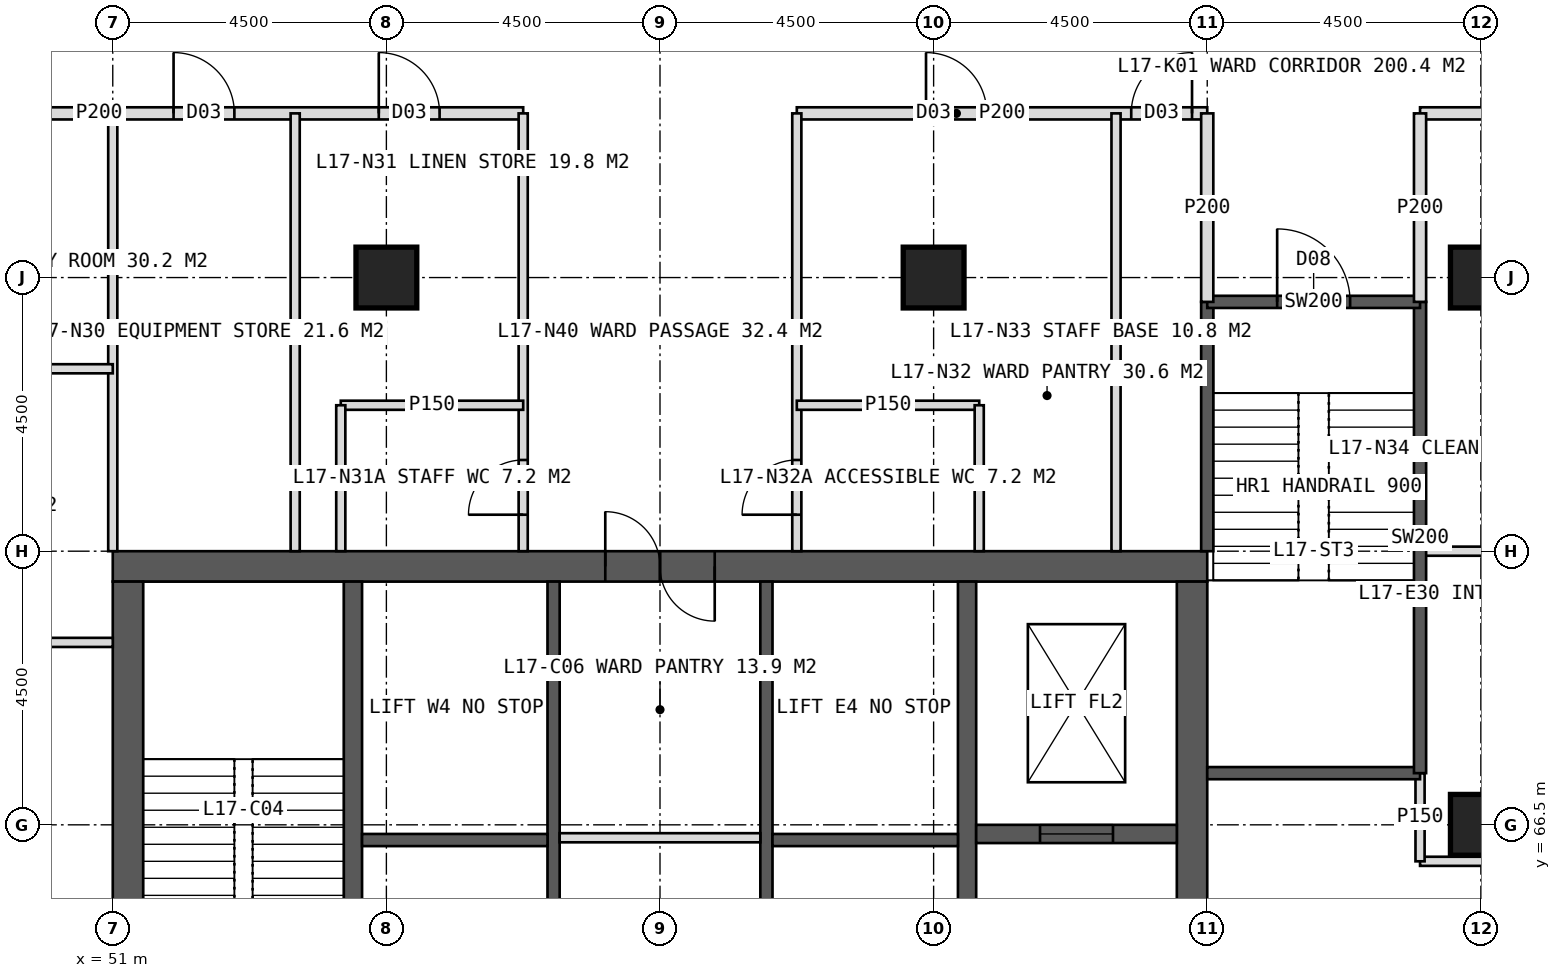
"""IFC4 building model, lengths in metres.
Left out: names, types, materials, properties, quantities, classifications, styles, units other than length and angle.
Written with IfcOpenShell. Run it as: python <this file> out.ifc"""

import sys

from ifc_helpers import new_model, si_unit, direction, frame, frame_2d, origin, origin_2d, place, context, subcontext, project, spatial, rectangle, hollow_rectangle, extrude, element, fill, save


model = new_model("IFC4")
c1 = context("Model", 3, precision=1e-05, world=origin(), true_north=direction((0.0, 1.0)))
c2 = subcontext(c1, "Body", "Model", "MODEL_VIEW")
j1 = project(units=[si_unit("LENGTHUNIT", "METRE"), si_unit("PLANEANGLEUNIT", "RADIAN")], contexts=[c1])
p1 = place(None, origin())
s1 = spatial("IfcSite", under=j1, at=p1, CompositionType="ELEMENT")
p2 = place(p1, origin())
s2 = spatial("IfcBuilding", under=s1, at=p2, CompositionType="ELEMENT")
p3 = place(p2, frame((0.0, 0.0, 75.0)))
s3 = spatial("IfcBuildingStorey", under=s2, at=p3, CompositionType="ELEMENT", Elevation=75.0)
p4 = place(p3, frame((51.0, 70.75, 0.0), z_axis=(0.0, 0.0, 1.0), x_axis=(1.0, 0.0, 0.0)))
e1 = element("IfcWall", 1, at=p4, inside=s3, PredefinedType="SHEAR", context=c2, shape_type="SweptSolid", body=[
    extrude(rectangle(XDim=18.0, YDim=0.5, at=frame_2d((9.0, 0.0))), origin(), (0.0, 0.0, 1.0), 4.0),
])
p5 = place(p4, frame((8.1, 0.0, 0.0)))
e2 = element("IfcOpeningElement", 2, at=p5, cuts=e1, PredefinedType="OPENING", context=c2, shape_type="SweptSolid", body=[
    extrude(rectangle(XDim=1.8, YDim=2.2, at=frame_2d((0.9, 1.1))), frame((0.0, 0.26, 0.0), z_axis=(0.0, -1.0, 0.0), x_axis=(1.0, 0.0, 0.0)), (0.0, 0.0, 1.0), 0.52),
])
p6 = place(p3, frame((51.25, 53.5, 0.0), z_axis=(0.0, 0.0, 1.0), x_axis=(0.0, 1.0, 0.0)))
e3 = element("IfcWall", 3, at=p6, inside=s3, PredefinedType="SHEAR", context=c2, shape_type="SweptSolid", body=[
    extrude(rectangle(XDim=17.0, YDim=0.5, at=frame_2d((8.5, 0.0))), origin(), (0.0, 0.0, 1.0), 4.0),
])
p7 = place(p6, frame((6.0, 0.0, 0.0)))
e4 = element("IfcOpeningElement", 4, at=p7, cuts=e3, PredefinedType="OPENING", context=c2, shape_type="SweptSolid", body=[
    extrude(rectangle(XDim=1.5, YDim=2.2, at=frame_2d((0.75, 1.1))), frame((0.0, 0.26, 0.0), z_axis=(0.0, -1.0, 0.0), x_axis=(1.0, 0.0, 0.0)), (0.0, 0.0, 1.0), 0.52),
])
p8 = place(p3, frame((68.75, 53.5, 0.0), z_axis=(0.0, 0.0, 1.0), x_axis=(0.0, 1.0, 0.0)))
e5 = element("IfcWall", 5, at=p8, inside=s3, PredefinedType="SHEAR", context=c2, shape_type="SweptSolid", body=[
    extrude(rectangle(XDim=17.0, YDim=0.5, at=frame_2d((8.5, 0.0))), origin(), (0.0, 0.0, 1.0), 4.0),
])
p9 = place(p8, frame((9.5, 0.0, 0.0)))
e6 = element("IfcOpeningElement", 6, at=p9, cuts=e5, PredefinedType="OPENING", context=c2, shape_type="SweptSolid", body=[
    extrude(rectangle(XDim=1.5, YDim=2.2, at=frame_2d((0.75, 1.1))), frame((0.0, 0.26, 0.0), z_axis=(0.0, -1.0, 0.0), x_axis=(1.0, 0.0, 0.0)), (0.0, 0.0, 1.0), 0.52),
])
for number, where, z_axis, x_axis in (
    (7, (54.95, 53.5, 0.0), (0.0, 0.0, 1.0), (0.0, 1.0, 0.0)),
    (8, (65.05, 53.5, 0.0), (0.0, 0.0, 1.0), (0.0, 1.0, 0.0)),
):
    element("IfcWall", number, at=place(p3, frame(where, z_axis=z_axis, x_axis=x_axis)), inside=s3, PredefinedType="SHEAR", context=c2, shape_type="SweptSolid", body=[
        extrude(rectangle(XDim=17.0, YDim=0.3, at=frame_2d((8.5, 0.0))), origin(), (0.0, 0.0, 1.0), 4.0),
    ])
p10 = place(p3, frame((58.25, 53.5, 0.0), z_axis=(0.0, 0.0, 1.0), x_axis=(0.0, 1.0, 0.0)))
e9 = element("IfcWall", 9, at=p10, inside=s3, PredefinedType="SHEAR", context=c2, shape_type="SweptSolid", body=[
    extrude(rectangle(XDim=17.0, YDim=0.2, at=frame_2d((8.5, 0.0))), origin(), (0.0, 0.0, 1.0), 4.0),
])
p11 = place(p10, frame((1.375, 0.0, 0.0)))
e10 = element("IfcOpeningElement", 10, at=p11, cuts=e9, PredefinedType="OPENING", context=c2, shape_type="SweptSolid", body=[
    extrude(rectangle(XDim=1.4, YDim=2.2, at=frame_2d((0.7, 1.1))), frame((0.0, 0.11, 0.0), z_axis=(0.0, -1.0, 0.0), x_axis=(1.0, 0.0, 0.0)), (0.0, 0.0, 1.0), 0.22),
])
p12 = place(p10, frame((5.675, 0.0, 0.0)))
e11 = element("IfcOpeningElement", 11, at=p12, cuts=e9, PredefinedType="OPENING", context=c2, shape_type="SweptSolid", body=[
    extrude(rectangle(XDim=1.4, YDim=2.2, at=frame_2d((0.7, 1.1))), frame((0.0, 0.11, 0.0), z_axis=(0.0, -1.0, 0.0), x_axis=(1.0, 0.0, 0.0)), (0.0, 0.0, 1.0), 0.22),
])
p13 = place(p3, frame((61.75, 53.5, 0.0), z_axis=(0.0, 0.0, 1.0), x_axis=(0.0, 1.0, 0.0)))
e12 = element("IfcWall", 12, at=p13, inside=s3, PredefinedType="SHEAR", context=c2, shape_type="SweptSolid", body=[
    extrude(rectangle(XDim=17.0, YDim=0.2, at=frame_2d((8.5, 0.0))), origin(), (0.0, 0.0, 1.0), 4.0),
])
p14 = place(p13, frame((1.375, 0.0, 0.0)))
e13 = element("IfcOpeningElement", 13, at=p14, cuts=e12, PredefinedType="OPENING", context=c2, shape_type="SweptSolid", body=[
    extrude(rectangle(XDim=1.4, YDim=2.2, at=frame_2d((0.7, 1.1))), frame((0.0, 0.11, 0.0), z_axis=(0.0, -1.0, 0.0), x_axis=(1.0, 0.0, 0.0)), (0.0, 0.0, 1.0), 0.22),
])
p15 = place(p13, frame((5.675, 0.0, 0.0)))
e14 = element("IfcOpeningElement", 14, at=p15, cuts=e12, PredefinedType="OPENING", context=c2, shape_type="SweptSolid", body=[
    extrude(rectangle(XDim=1.4, YDim=2.2, at=frame_2d((0.7, 1.1))), frame((0.0, 0.11, 0.0), z_axis=(0.0, -1.0, 0.0), x_axis=(1.0, 0.0, 0.0)), (0.0, 0.0, 1.0), 0.22),
])
for number, where, z_axis, x_axis in (
    (15, (55.1, 66.25, 0.0), (0.0, 0.0, 1.0), (1.0, 0.0, 0.0)),
    (16, (61.85, 66.25, 0.0), (0.0, 0.0, 1.0), (1.0, 0.0, 0.0)),
):
    element("IfcWall", number, at=place(p3, frame(where, z_axis=z_axis, x_axis=x_axis)), inside=s3, PredefinedType="SHEAR", context=c2, shape_type="SweptSolid", body=[
        extrude(rectangle(XDim=3.05, YDim=0.2, at=frame_2d((1.525, 0.0))), origin(), (0.0, 0.0, 1.0), 4.0),
    ])
p16 = place(p3, frame((65.2, 66.35, 0.0), z_axis=(0.0, 0.0, 1.0), x_axis=(1.0, 0.0, 0.0)))
e17 = element("IfcWall", 17, at=p16, inside=s3, PredefinedType="SHEAR", context=c2, shape_type="SweptSolid", body=[
    extrude(rectangle(XDim=3.3, YDim=0.3, at=frame_2d((1.65, 0.0))), origin(), (0.0, 0.0, 1.0), 4.0),
])
p17 = place(p16, frame((1.05, 0.0, 0.0)))
e18 = element("IfcOpeningElement", 18, at=p17, cuts=e17, PredefinedType="OPENING", context=c2, shape_type="SweptSolid", body=[
    extrude(rectangle(XDim=1.2, YDim=2.2, at=frame_2d((0.6, 1.1))), frame((0.0, 0.16, 0.0), z_axis=(0.0, -1.0, 0.0), x_axis=(1.0, 0.0, 0.0)), (0.0, 0.0, 1.0), 0.32),
])
for number, where, z_axis, x_axis in (
    (19, (73.5, 75.5, 0.0), (0.0, 0.0, 1.0), (1.0, 0.0, 0.0)),
    (20, (55.5, 75.5, 0.0), (0.0, 0.0, 1.0), (1.0, 0.0, 0.0)),
    (21, (64.5, 75.5, 0.0), (0.0, 0.0, 1.0), (1.0, 0.0, 0.0)),
    (22, (73.5, 66.5, 0.0), (0.0, 0.0, 1.0), (1.0, 0.0, 0.0)),
):
    element("IfcColumn", number, at=place(p3, frame(where, z_axis=z_axis, x_axis=x_axis)), inside=s3, PredefinedType="COLUMN", context=c2, shape_type="SweptSolid", body=[
        extrude(hollow_rectangle(XDim=1.0, YDim=1.0, WallThickness=0.1, at=origin_2d()), origin(), (0.0, 0.0, 1.0), 4.0),
    ])
p18 = place(p3, frame((51.0, 71.0, 0.0), z_axis=(0.0, 0.0, 1.0), x_axis=(0.0, 1.0, 0.0)))
e23 = element("IfcWall", 23, at=p18, inside=s3, PredefinedType="PARTITIONING", context=c2, shape_type="SweptSolid", body=[
    extrude(rectangle(XDim=7.2, YDim=0.15, at=frame_2d((3.6, 0.0))), origin(), (0.0, 0.0, 1.0), 3.75),
])
p19 = place(p3, frame((43.8, 78.2, 0.0), z_axis=(0.0, 0.0, 1.0), x_axis=(1.0, 0.0, 0.0)))
e24 = element("IfcWall", 24, at=p19, inside=s3, PredefinedType="PARTITIONING", context=c2, shape_type="SweptSolid", body=[
    extrude(rectangle(XDim=13.95, YDim=0.2, at=frame_2d((6.975, 0.0))), origin(), (0.0, 0.0, 1.0), 3.75),
])
p20 = place(p19, frame((8.2, 0.0, 0.0)))
e25 = element("IfcOpeningElement", 25, at=p20, cuts=e24, PredefinedType="OPENING", context=c2, shape_type="SweptSolid", body=[
    extrude(rectangle(XDim=1.0, YDim=2.1, at=frame_2d((0.5, 1.05))), frame((0.0, 0.11, 0.0), z_axis=(0.0, -1.0, 0.0), x_axis=(1.0, 0.0, 0.0)), (0.0, 0.0, 1.0), 0.22),
])
p21 = place(p19, frame((11.575, 0.0, 0.0)))
e26 = element("IfcOpeningElement", 26, at=p21, cuts=e24, PredefinedType="OPENING", context=c2, shape_type="SweptSolid", body=[
    extrude(rectangle(XDim=1.0, YDim=2.1, at=frame_2d((0.5, 1.05))), frame((0.0, 0.11, 0.0), z_axis=(0.0, -1.0, 0.0), x_axis=(1.0, 0.0, 0.0)), (0.0, 0.0, 1.0), 0.22),
])
p22 = place(p3, frame((62.25, 78.2, 0.0), z_axis=(0.0, 0.0, 1.0), x_axis=(1.0, 0.0, 0.0)))
e27 = element("IfcWall", 27, at=p22, inside=s3, PredefinedType="PARTITIONING", context=c2, shape_type="SweptSolid", body=[
    extrude(rectangle(XDim=6.75, YDim=0.2, at=frame_2d((3.375, 0.0))), origin(), (0.0, 0.0, 1.0), 3.75),
])
p23 = place(p22, frame((2.125, 0.0, 0.0)))
e28 = element("IfcOpeningElement", 28, at=p23, cuts=e27, PredefinedType="OPENING", context=c2, shape_type="SweptSolid", body=[
    extrude(rectangle(XDim=1.0, YDim=2.1, at=frame_2d((0.5, 1.05))), frame((0.0, 0.11, 0.0), z_axis=(0.0, -1.0, 0.0), x_axis=(1.0, 0.0, 0.0)), (0.0, 0.0, 1.0), 0.22),
])
p24 = place(p22, frame((5.5, 0.0, 0.0)))
e29 = element("IfcOpeningElement", 29, at=p24, cuts=e27, PredefinedType="OPENING", context=c2, shape_type="SweptSolid", body=[
    extrude(rectangle(XDim=1.0, YDim=2.1, at=frame_2d((0.5, 1.05))), frame((0.0, 0.11, 0.0), z_axis=(0.0, -1.0, 0.0), x_axis=(1.0, 0.0, 0.0)), (0.0, 0.0, 1.0), 0.22),
])
p25 = place(p3, frame((72.5, 78.2, 0.0), z_axis=(0.0, 0.0, 1.0), x_axis=(1.0, 0.0, 0.0)))
e30 = element("IfcWall", 30, at=p25, inside=s3, PredefinedType="PARTITIONING", context=c2, shape_type="SweptSolid", body=[
    extrude(rectangle(XDim=3.7, YDim=0.2, at=frame_2d((1.85, 0.0))), origin(), (0.0, 0.0, 1.0), 3.75),
])
p26 = place(p25, frame((1.1, 0.0, 0.0)))
e31 = element("IfcOpeningElement", 31, at=p26, cuts=e30, PredefinedType="OPENING", context=c2, shape_type="SweptSolid", body=[
    extrude(rectangle(XDim=1.0, YDim=2.1, at=frame_2d((0.5, 1.05))), frame((0.0, 0.11, 0.0), z_axis=(0.0, -1.0, 0.0), x_axis=(1.0, 0.0, 0.0)), (0.0, 0.0, 1.0), 0.22),
])
p27 = place(p3, frame((57.75, 71.0, 0.0), z_axis=(0.0, 0.0, 1.0), x_axis=(0.0, 1.0, 0.0)))
e32 = element("IfcWall", 32, at=p27, inside=s3, PredefinedType="PARTITIONING", context=c2, shape_type="SweptSolid", body=[
    extrude(rectangle(XDim=7.2, YDim=0.15, at=frame_2d((3.6, 0.0))), origin(), (0.0, 0.0, 1.0), 3.75),
])
p28 = place(p27, frame((0.6, 0.0, 0.0)))
e33 = element("IfcOpeningElement", 33, at=p28, cuts=e32, PredefinedType="OPENING", context=c2, shape_type="SweptSolid", body=[
    extrude(rectangle(XDim=0.9, YDim=2.1, at=frame_2d((0.45, 1.05))), frame((0.0, 0.085, 0.0), z_axis=(0.0, -1.0, 0.0), x_axis=(1.0, 0.0, 0.0)), (0.0, 0.0, 1.0), 0.17),
])
p29 = place(p3, frame((62.25, 71.0, 0.0), z_axis=(0.0, 0.0, 1.0), x_axis=(0.0, 1.0, 0.0)))
e34 = element("IfcWall", 34, at=p29, inside=s3, PredefinedType="PARTITIONING", context=c2, shape_type="SweptSolid", body=[
    extrude(rectangle(XDim=7.2, YDim=0.15, at=frame_2d((3.6, 0.0))), origin(), (0.0, 0.0, 1.0), 3.75),
])
p30 = place(p29, frame((0.6, 0.0, 0.0)))
e35 = element("IfcOpeningElement", 35, at=p30, cuts=e34, PredefinedType="OPENING", context=c2, shape_type="SweptSolid", body=[
    extrude(rectangle(XDim=0.9, YDim=2.1, at=frame_2d((0.45, 1.05))), frame((0.0, 0.085, 0.0), z_axis=(0.0, -1.0, 0.0), x_axis=(1.0, 0.0, 0.0)), (0.0, 0.0, 1.0), 0.17),
])
for number, where, z_axis, x_axis in (
    (36, (54.0, 71.0, 0.0), (0.0, 0.0, 1.0), (0.0, 1.0, 0.0)),
    (37, (67.5, 71.0, 0.0), (0.0, 0.0, 1.0), (0.0, 1.0, 0.0)),
):
    element("IfcWall", number, at=place(p3, frame(where, z_axis=z_axis, x_axis=x_axis)), inside=s3, PredefinedType="PARTITIONING", context=c2, shape_type="SweptSolid", body=[
        extrude(rectangle(XDim=7.2, YDim=0.15, at=frame_2d((3.6, 0.0))), origin(), (0.0, 0.0, 1.0), 3.75),
    ])
p31 = place(p3, frame((54.75, 73.4, 0.0), z_axis=(0.0, 0.0, 1.0), x_axis=(1.0, 0.0, 0.0)))
e38 = element("IfcWall", 38, at=p31, inside=s3, PredefinedType="PARTITIONING", context=c2, shape_type="SweptSolid", body=[
    extrude(rectangle(XDim=3.0, YDim=0.15, at=frame_2d((1.5, 0.0))), origin(), (0.0, 0.0, 1.0), 3.75),
])
p32 = place(p3, frame((54.75, 71.0, 0.0), z_axis=(0.0, 0.0, 1.0), x_axis=(0.0, 1.0, 0.0)))
e39 = element("IfcWall", 39, at=p32, inside=s3, PredefinedType="PARTITIONING", context=c2, shape_type="SweptSolid", body=[
    extrude(rectangle(XDim=2.4, YDim=0.15, at=frame_2d((1.2, 0.0))), origin(), (0.0, 0.0, 1.0), 3.75),
])
p33 = place(p3, frame((62.25, 73.4, 0.0), z_axis=(0.0, 0.0, 1.0), x_axis=(1.0, 0.0, 0.0)))
e40 = element("IfcWall", 40, at=p33, inside=s3, PredefinedType="PARTITIONING", context=c2, shape_type="SweptSolid", body=[
    extrude(rectangle(XDim=3.0, YDim=0.15, at=frame_2d((1.5, 0.0))), origin(), (0.0, 0.0, 1.0), 3.75),
])
p34 = place(p3, frame((65.25, 71.0, 0.0), z_axis=(0.0, 0.0, 1.0), x_axis=(0.0, 1.0, 0.0)))
e41 = element("IfcWall", 41, at=p34, inside=s3, PredefinedType="PARTITIONING", context=c2, shape_type="SweptSolid", body=[
    extrude(rectangle(XDim=2.4, YDim=0.15, at=frame_2d((1.2, 0.0))), origin(), (0.0, 0.0, 1.0), 3.75),
])
for number, where, z_axis, x_axis in (
    (42, (51.0, 69.5, 0.0), (0.0, 0.0, 1.0), (-1.0, 0.0, 0.0)),
    (43, (51.0, 74.0, 0.0), (0.0, 0.0, 1.0), (-1.0, 0.0, 0.0)),
):
    element("IfcWall", number, at=place(p3, frame(where, z_axis=z_axis, x_axis=x_axis)), inside=s3, PredefinedType="PARTITIONING", context=c2, shape_type="SweptSolid", body=[
        extrude(rectangle(XDim=7.2, YDim=0.15, at=frame_2d((3.6, 0.0))), origin(), (0.0, 0.0, 1.0), 3.75),
    ])
for number, where, z_axis, x_axis in (
    (44, (72.5, 71.0, 0.0), (0.0, 0.0, 1.0), (1.0, 0.0, 0.0)),
    (45, (72.5, 65.9, 0.0), (0.0, 0.0, 1.0), (1.0, 0.0, 0.0)),
):
    element("IfcWall", number, at=place(p3, frame(where, z_axis=z_axis, x_axis=x_axis)), inside=s3, PredefinedType="PARTITIONING", context=c2, shape_type="SweptSolid", body=[
        extrude(rectangle(XDim=3.7, YDim=0.15, at=frame_2d((1.85, 0.0))), origin(), (0.0, 0.0, 1.0), 3.75),
    ])
p35 = place(p3, frame((58.35, 66.288, 0.0), z_axis=(0.0, 0.0, 1.0), x_axis=(1.0, 0.0, 0.0)))
e46 = element("IfcWall", 46, at=p35, inside=s3, PredefinedType="PARTITIONING", context=c2, shape_type="SweptSolid", body=[
    extrude(rectangle(XDim=3.3, YDim=0.15, at=frame_2d((1.65, 0.0))), origin(), (0.0, 0.0, 1.0), 3.75),
])
p36 = place(p3, frame((72.5, 65.9, 0.0), z_axis=(0.0, 0.0, 1.0), x_axis=(0.0, 1.0, 0.0)))
e47 = element("IfcWall", 47, at=p36, inside=s3, PredefinedType="PARTITIONING", context=c2, shape_type="SweptSolid", body=[
    extrude(rectangle(XDim=1.45, YDim=0.15, at=frame_2d((0.725, 0.0))), origin(), (0.0, 0.0, 1.0), 3.75),
])
p37 = place(p3, frame((69.0, 71.0, 0.0), z_axis=(0.0, 0.0, 1.0), x_axis=(0.0, 1.0, 0.0)))
e48 = element("IfcWall", 48, at=p37, inside=s3, PredefinedType="SOLIDWALL", context=c2, shape_type="SweptSolid", body=[
    extrude(rectangle(XDim=4.1, YDim=0.2, at=frame_2d((2.05, 0.0))), origin(), (0.0, 0.0, 1.0), 3.75),
])
p38 = place(p3, frame((69.0, 67.35, 0.0), z_axis=(0.0, 0.0, 1.0), x_axis=(1.0, 0.0, 0.0)))
e49 = element("IfcWall", 49, at=p38, inside=s3, PredefinedType="SOLIDWALL", context=c2, shape_type="SweptSolid", body=[
    extrude(rectangle(XDim=3.5, YDim=0.2, at=frame_2d((1.75, 0.0))), origin(), (0.0, 0.0, 1.0), 3.75),
])
p39 = place(p3, frame((72.5, 67.35, 0.0), z_axis=(0.0, 0.0, 1.0), x_axis=(0.0, 1.0, 0.0)))
e50 = element("IfcWall", 50, at=p39, inside=s3, PredefinedType="SOLIDWALL", context=c2, shape_type="SweptSolid", body=[
    extrude(rectangle(XDim=7.75, YDim=0.2, at=frame_2d((3.875, 0.0))), origin(), (0.0, 0.0, 1.0), 3.75),
])
p40 = place(p3, frame((69.0, 75.1, 0.0), z_axis=(0.0, 0.0, 1.0), x_axis=(1.0, 0.0, 0.0)))
e51 = element("IfcWall", 51, at=p40, inside=s3, PredefinedType="SOLIDWALL", context=c2, shape_type="SweptSolid", body=[
    extrude(rectangle(XDim=3.5, YDim=0.2, at=frame_2d((1.75, 0.0))), origin(), (0.0, 0.0, 1.0), 3.75),
])
p41 = place(p40, frame((1.15, 0.0, 0.0)))
e52 = element("IfcOpeningElement", 52, at=p41, cuts=e51, PredefinedType="OPENING", context=c2, shape_type="SweptSolid", body=[
    extrude(rectangle(XDim=1.2, YDim=2.1, at=frame_2d((0.6, 1.05))), frame((0.0, 0.11, 0.0), z_axis=(0.0, -1.0, 0.0), x_axis=(1.0, 0.0, 0.0)), (0.0, 0.0, 1.0), 0.22),
])
for number, where, z_axis, x_axis in (
    (53, (69.0, 75.1, 0.0), (0.0, 0.0, 1.0), (0.0, 1.0, 0.0)),
    (54, (72.5, 75.1, 0.0), (0.0, 0.0, 1.0), (0.0, 1.0, 0.0)),
):
    element("IfcWall", number, at=place(p3, frame(where, z_axis=z_axis, x_axis=x_axis)), inside=s3, PredefinedType="PARTITIONING", context=c2, shape_type="SweptSolid", body=[
        extrude(rectangle(XDim=3.1, YDim=0.2, at=frame_2d((1.55, 0.0))), origin(), (0.0, 0.0, 1.0), 3.75),
    ])
p42 = place(p20, origin())
e55 = element("IfcDoor", 55, at=p42, inside=s3, OperationType="SINGLE_SWING_LEFT", PredefinedType="DOOR", context=c2, shape_type="SweptSolid", body=[
    extrude(rectangle(XDim=1.0, YDim=2.1, at=frame_2d((0.5, 1.05))), frame((0.0, 0.025, 0.0), z_axis=(0.0, -1.0, 0.0), x_axis=(1.0, 0.0, 0.0)), (0.0, 0.0, 1.0), 0.05),
])
fill(e25, e55)
p43 = place(p28, origin())
e56 = element("IfcDoor", 56, at=p43, inside=s3, OperationType="SINGLE_SWING_LEFT", PredefinedType="DOOR", context=c2, shape_type="SweptSolid", body=[
    extrude(rectangle(XDim=0.9, YDim=2.1, at=frame_2d((0.45, 1.05))), frame((0.0, 0.025, 0.0), z_axis=(0.0, -1.0, 0.0), x_axis=(1.0, 0.0, 0.0)), (0.0, 0.0, 1.0), 0.05),
])
fill(e33, e56)
p44 = place(p21, origin())
e57 = element("IfcDoor", 57, at=p44, inside=s3, OperationType="SINGLE_SWING_LEFT", PredefinedType="DOOR", context=c2, shape_type="SweptSolid", body=[
    extrude(rectangle(XDim=1.0, YDim=2.1, at=frame_2d((0.5, 1.05))), frame((0.0, 0.025, 0.0), z_axis=(0.0, -1.0, 0.0), x_axis=(1.0, 0.0, 0.0)), (0.0, 0.0, 1.0), 0.05),
])
fill(e26, e57)
p45 = place(p30, origin())
e58 = element("IfcDoor", 58, at=p45, inside=s3, OperationType="SINGLE_SWING_LEFT", PredefinedType="DOOR", context=c2, shape_type="SweptSolid", body=[
    extrude(rectangle(XDim=0.9, YDim=2.1, at=frame_2d((0.45, 1.05))), frame((0.0, 0.025, 0.0), z_axis=(0.0, -1.0, 0.0), x_axis=(1.0, 0.0, 0.0)), (0.0, 0.0, 1.0), 0.05),
])
fill(e35, e58)
p46 = place(p23, origin())
e59 = element("IfcDoor", 59, at=p46, inside=s3, OperationType="SINGLE_SWING_LEFT", PredefinedType="DOOR", context=c2, shape_type="SweptSolid", body=[
    extrude(rectangle(XDim=1.0, YDim=2.1, at=frame_2d((0.5, 1.05))), frame((0.0, 0.025, 0.0), z_axis=(0.0, -1.0, 0.0), x_axis=(1.0, 0.0, 0.0)), (0.0, 0.0, 1.0), 0.05),
])
fill(e28, e59)
p47 = place(p24, origin())
e60 = element("IfcDoor", 60, at=p47, inside=s3, OperationType="SINGLE_SWING_RIGHT", PredefinedType="DOOR", context=c2, shape_type="SweptSolid", body=[
    extrude(rectangle(XDim=1.0, YDim=2.1, at=frame_2d((0.5, 1.05))), frame((0.0, 0.025, 0.0), z_axis=(0.0, -1.0, 0.0), x_axis=(1.0, 0.0, 0.0)), (0.0, 0.0, 1.0), 0.05),
])
fill(e29, e60)
p48 = place(p17, origin())
e61 = element("IfcDoor", 61, at=p48, inside=s3, OperationType="SLIDING_TO_LEFT", PredefinedType="DOOR", context=c2, shape_type="SweptSolid", body=[
    extrude(rectangle(XDim=1.2, YDim=2.2, at=frame_2d((0.6, 1.1))), frame((0.0, 0.025, 0.0), z_axis=(0.0, -1.0, 0.0), x_axis=(1.0, 0.0, 0.0)), (0.0, 0.0, 1.0), 0.05),
])
fill(e18, e61)
p49 = place(p5, origin())
e62 = element("IfcDoor", 62, at=p49, inside=s3, OperationType="DOUBLE_DOOR_SINGLE_SWING", PredefinedType="DOOR", context=c2, shape_type="SweptSolid", body=[
    extrude(rectangle(XDim=1.8, YDim=2.2, at=frame_2d((0.9, 1.1))), frame((0.0, 0.025, 0.0), z_axis=(0.0, -1.0, 0.0), x_axis=(1.0, 0.0, 0.0)), (0.0, 0.0, 1.0), 0.05),
])
fill(e2, e62)
p50 = place(p41, origin())
e63 = element("IfcDoor", 63, at=p50, inside=s3, OperationType="SINGLE_SWING_LEFT", PredefinedType="DOOR", context=c2, shape_type="SweptSolid", body=[
    extrude(rectangle(XDim=1.2, YDim=2.1, at=frame_2d((0.6, 1.05))), frame((0.0, 0.025, 0.0), z_axis=(0.0, -1.0, 0.0), x_axis=(1.0, 0.0, 0.0)), (0.0, 0.0, 1.0), 0.05),
])
fill(e52, e63)
save(model, sys.argv[1])
